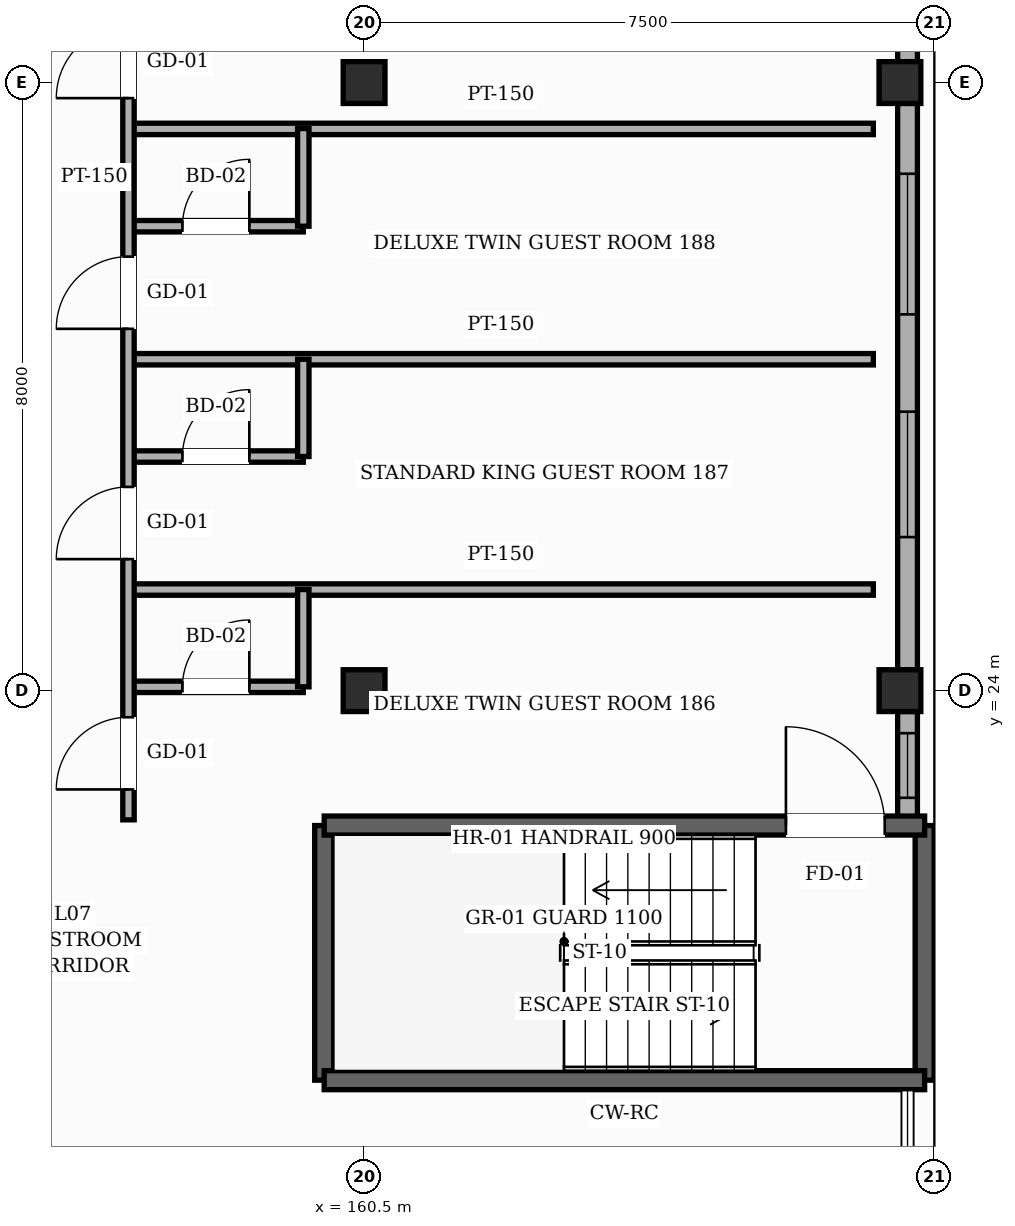
"""IFC4 building model, lengths in metres.
Left out: names, types, materials, properties, quantities, classifications, styles, units other than length and angle.
Written with IfcOpenShell. Run it as: python <this file> out.ifc"""

import sys

from ifc_helpers import new_model, si_unit, direction, frame, frame_2d, origin, origin_2d, place, context, subcontext, project, spatial, rectangle, hollow_rectangle, extrude, element, fill, save


model = new_model("IFC4")
c1 = context("Model", 3, precision=1e-05, world=origin(), true_north=direction((0.0, 1.0)))
c2 = subcontext(c1, "Body", "Model", "MODEL_VIEW")
j1 = project(units=[si_unit("LENGTHUNIT", "METRE"), si_unit("PLANEANGLEUNIT", "RADIAN")], contexts=[c1])
p1 = place(None, origin())
s1 = spatial("IfcSite", under=j1, at=p1, CompositionType="ELEMENT")
p2 = place(p1, origin())
s2 = spatial("IfcBuilding", under=s1, at=p2, CompositionType="ELEMENT")
p3 = place(p2, frame((0.0, 0.0, 31.8)))
s3 = spatial("IfcBuildingStorey", under=s2, at=p3, CompositionType="ELEMENT", Elevation=31.8)
for number, where, z_axis, x_axis in (
    (1, (160.5, 24.0, 0.0), (0.0, 0.0, 1.0), (1.0, 0.0, 0.0)),
    (2, (160.5, 32.0, 0.0), (0.0, 0.0, 1.0), (1.0, 0.0, 0.0)),
    (3, (167.55, 24.0, 0.0), (0.0, 0.0, 1.0), (1.0, 0.0, 0.0)),
    (4, (167.55, 32.0, 0.0), (0.0, 0.0, 1.0), (1.0, 0.0, 0.0)),
):
    element("IfcColumn", number, at=place(p3, frame(where, z_axis=z_axis, x_axis=x_axis)), inside=s3, PredefinedType="COLUMN", context=c2, shape_type="SweptSolid", body=[
        extrude(hollow_rectangle(XDim=0.55, YDim=0.55, WallThickness=0.022, InnerFilletRadius=0.022, OuterFilletRadius=0.044, at=origin_2d()), origin(), (0.0, 0.0, 1.0), 3.6),
    ])
p4 = place(p3, frame((167.65, 23.725, 0.0), z_axis=(0.0, 0.0, 1.0), x_axis=(0.0, -1.0, 0.0)))
e5 = element("IfcWall", 5, at=p4, inside=s3, PredefinedType="SOLIDWALL", context=c2, shape_type="SweptSolid", body=[
    extrude(rectangle(XDim=1.5, YDim=0.26, at=frame_2d((0.75, 0.0))), origin(), (0.0, 0.0, 1.0), 3.365),
])
p5 = place(p4, frame((0.285, 0.0, 0.85)))
e6 = element("IfcOpeningElement", 6, at=p5, cuts=e5, PredefinedType="OPENING", context=c2, shape_type="SweptSolid", body=[
    extrude(rectangle(XDim=0.85, YDim=1.35, at=frame_2d((0.425, 0.675))), frame((0.0, 0.14, 0.0), z_axis=(0.0, -1.0, 0.0), x_axis=(1.0, 0.0, 0.0)), (0.0, 0.0, 1.0), 0.28),
])
p6 = place(p3, frame((167.65, 31.725, 0.0), z_axis=(0.0, 0.0, 1.0), x_axis=(0.0, -1.0, 0.0)))
e7 = element("IfcWall", 7, at=p6, inside=s3, PredefinedType="SOLIDWALL", context=c2, shape_type="SweptSolid", body=[
    extrude(rectangle(XDim=7.45, YDim=0.26, at=frame_2d((3.725, 0.0))), origin(), (0.0, 0.0, 1.0), 2.755),
])
p7 = place(p6, frame((4.055, 0.0, 0.85)))
e8 = element("IfcOpeningElement", 8, at=p7, cuts=e7, PredefinedType="OPENING", context=c2, shape_type="SweptSolid", body=[
    extrude(rectangle(XDim=1.65, YDim=1.5, at=frame_2d((0.825, 0.75))), frame((0.0, 0.14, 0.0), z_axis=(0.0, -1.0, 0.0), x_axis=(1.0, 0.0, 0.0)), (0.0, 0.0, 1.0), 0.28),
])
p8 = place(p6, frame((0.925, 0.0, 0.85)))
e9 = element("IfcOpeningElement", 9, at=p8, cuts=e7, PredefinedType="OPENING", context=c2, shape_type="SweptSolid", body=[
    extrude(rectangle(XDim=1.85, YDim=1.5, at=frame_2d((0.925, 0.75))), frame((0.0, 0.14, 0.0), z_axis=(0.0, -1.0, 0.0), x_axis=(1.0, 0.0, 0.0)), (0.0, 0.0, 1.0), 0.28),
])
p9 = place(p3, frame((167.65, 40.625, 0.0), z_axis=(0.0, 0.0, 1.0), x_axis=(0.0, -1.0, 0.0)))
e10 = element("IfcWall", 10, at=p9, inside=s3, PredefinedType="SOLIDWALL", context=c2, shape_type="SweptSolid", body=[
    extrude(rectangle(XDim=8.35, YDim=0.26, at=frame_2d((4.175, 0.0))), origin(), (0.0, 0.0, 1.0), 2.755),
])
p10 = place(p9, frame((6.85, 0.0, 0.85)))
e11 = element("IfcOpeningElement", 11, at=p10, cuts=e10, PredefinedType="OPENING", context=c2, shape_type="SweptSolid", body=[
    extrude(rectangle(XDim=0.85, YDim=1.35, at=frame_2d((0.425, 0.675))), frame((0.0, 0.14, 0.0), z_axis=(0.0, -1.0, 0.0), x_axis=(1.0, 0.0, 0.0)), (0.0, 0.0, 1.0), 0.28),
])
p11 = place(p9, frame((4.11, 0.0, 0.85)))
e12 = element("IfcOpeningElement", 12, at=p11, cuts=e10, PredefinedType="OPENING", context=c2, shape_type="SweptSolid", body=[
    extrude(rectangle(XDim=1.15, YDim=1.65, at=frame_2d((0.575, 0.825))), frame((0.0, 0.14, 0.0), z_axis=(0.0, -1.0, 0.0), x_axis=(1.0, 0.0, 0.0)), (0.0, 0.0, 1.0), 0.28),
])
p12 = place(p9, frame((0.98, 0.0, 0.85)))
e13 = element("IfcOpeningElement", 13, at=p12, cuts=e10, PredefinedType="OPENING", context=c2, shape_type="SweptSolid", body=[
    extrude(rectangle(XDim=1.35, YDim=1.65, at=frame_2d((0.675, 0.825))), frame((0.0, 0.14, 0.0), z_axis=(0.0, -1.0, 0.0), x_axis=(1.0, 0.0, 0.0)), (0.0, 0.0, 1.0), 0.28),
])
for number, where, z_axis, x_axis in (
    (14, (167.875, 22.225, 0.0), (0.0, 0.0, 1.0), (0.0, -1.0, 0.0)),
    (15, (159.975, 18.875, 0.0), (0.0, 0.0, 1.0), (0.0, 1.0, 0.0)),
):
    element("IfcWall", number, at=place(p3, frame(where, z_axis=z_axis, x_axis=x_axis)), inside=s3, PredefinedType="SHEAR", context=c2, shape_type="SweptSolid", body=[
        extrude(rectangle(XDim=3.35, YDim=0.25, at=frame_2d((1.675, 0.0))), origin(), (0.0, 0.0, 1.0), 3.38),
    ])
p13 = place(p3, frame((159.975, 22.225, 0.0), z_axis=(0.0, 0.0, 1.0), x_axis=(1.0, 0.0, 0.0)))
e16 = element("IfcWall", 16, at=p13, inside=s3, PredefinedType="SHEAR", context=c2, shape_type="SweptSolid", body=[
    extrude(rectangle(XDim=7.9, YDim=0.25, at=frame_2d((3.95, 0.0))), origin(), (0.0, 0.0, 1.0), 3.38),
])
p14 = place(p13, frame((6.075, 0.0, 0.0)))
e17 = element("IfcOpeningElement", 17, at=p14, cuts=e16, PredefinedType="OPENING", context=c2, shape_type="SweptSolid", body=[
    extrude(rectangle(XDim=1.3, YDim=2.2, at=frame_2d((0.65, 1.1))), frame((0.0, 0.135, 0.0), z_axis=(0.0, -1.0, 0.0), x_axis=(1.0, 0.0, 0.0)), (0.0, 0.0, 1.0), 0.27),
])
p15 = place(p3, frame((167.875, 18.875, 0.0), z_axis=(0.0, 0.0, 1.0), x_axis=(-1.0, 0.0, 0.0)))
e18 = element("IfcWall", 18, at=p15, inside=s3, PredefinedType="SHEAR", context=c2, shape_type="SweptSolid", body=[
    extrude(rectangle(XDim=7.9, YDim=0.25, at=frame_2d((3.95, 0.0))), origin(), (0.0, 0.0, 1.0), 3.38),
])
p16 = place(p3, frame((157.4, 24.05, 0.0), z_axis=(0.0, 0.0, 1.0), x_axis=(1.0, 0.0, 0.0)))
e19 = element("IfcWall", 19, at=p16, inside=s3, PredefinedType="PARTITIONING", context=c2, shape_type="SweptSolid", body=[
    extrude(rectangle(XDim=2.3, YDim=0.15, at=frame_2d((1.15, 0.0))), origin(), (0.0, 0.0, 1.0), 2.755),
])
p17 = place(p16, frame((0.71, 0.0, 0.0)))
e20 = element("IfcOpeningElement", 20, at=p17, cuts=e19, PredefinedType="OPENING", context=c2, shape_type="SweptSolid", body=[
    extrude(rectangle(XDim=0.88, YDim=2.12, at=frame_2d((0.44, 1.06))), frame((0.0, 0.085, 0.0), z_axis=(0.0, -1.0, 0.0), x_axis=(1.0, 0.0, 0.0)), (0.0, 0.0, 1.0), 0.17),
])
p18 = place(p3, frame((157.4, 25.33, 0.0), z_axis=(0.0, 0.0, 1.0), x_axis=(1.0, 0.0, 0.0)))
e21 = element("IfcWall", 21, at=p18, inside=s3, PredefinedType="PARTITIONING", context=c2, shape_type="SweptSolid", body=[
    extrude(rectangle(XDim=9.8, YDim=0.15, at=frame_2d((4.9, 0.0))), origin(), (0.0, 0.0, 1.0), 3.365),
])
p19 = place(p3, frame((157.4, 27.08, 0.0), z_axis=(0.0, 0.0, 1.0), x_axis=(1.0, 0.0, 0.0)))
e22 = element("IfcWall", 22, at=p19, inside=s3, PredefinedType="PARTITIONING", context=c2, shape_type="SweptSolid", body=[
    extrude(rectangle(XDim=2.3, YDim=0.15, at=frame_2d((1.15, 0.0))), origin(), (0.0, 0.0, 1.0), 3.365),
])
p20 = place(p19, frame((0.71, 0.0, 0.0)))
e23 = element("IfcOpeningElement", 23, at=p20, cuts=e22, PredefinedType="OPENING", context=c2, shape_type="SweptSolid", body=[
    extrude(rectangle(XDim=0.88, YDim=2.12, at=frame_2d((0.44, 1.06))), frame((0.0, 0.085, 0.0), z_axis=(0.0, -1.0, 0.0), x_axis=(1.0, 0.0, 0.0)), (0.0, 0.0, 1.0), 0.17),
])
p21 = place(p3, frame((157.4, 28.36, 0.0), z_axis=(0.0, 0.0, 1.0), x_axis=(1.0, 0.0, 0.0)))
e24 = element("IfcWall", 24, at=p21, inside=s3, PredefinedType="PARTITIONING", context=c2, shape_type="SweptSolid", body=[
    extrude(rectangle(XDim=9.8, YDim=0.15, at=frame_2d((4.9, 0.0))), origin(), (0.0, 0.0, 1.0), 3.365),
])
p22 = place(p3, frame((157.4, 30.11, 0.0), z_axis=(0.0, 0.0, 1.0), x_axis=(1.0, 0.0, 0.0)))
e25 = element("IfcWall", 25, at=p22, inside=s3, PredefinedType="PARTITIONING", context=c2, shape_type="SweptSolid", body=[
    extrude(rectangle(XDim=2.3, YDim=0.15, at=frame_2d((1.15, 0.0))), origin(), (0.0, 0.0, 1.0), 3.365),
])
p23 = place(p22, frame((0.71, 0.0, 0.0)))
e26 = element("IfcOpeningElement", 26, at=p23, cuts=e25, PredefinedType="OPENING", context=c2, shape_type="SweptSolid", body=[
    extrude(rectangle(XDim=0.88, YDim=2.12, at=frame_2d((0.44, 1.06))), frame((0.0, 0.085, 0.0), z_axis=(0.0, -1.0, 0.0), x_axis=(1.0, 0.0, 0.0)), (0.0, 0.0, 1.0), 0.17),
])
p24 = place(p3, frame((157.4, 31.39, 0.0), z_axis=(0.0, 0.0, 1.0), x_axis=(1.0, 0.0, 0.0)))
e27 = element("IfcWall", 27, at=p24, inside=s3, PredefinedType="PARTITIONING", context=c2, shape_type="SweptSolid", body=[
    extrude(rectangle(XDim=9.8, YDim=0.15, at=frame_2d((4.9, 0.0))), origin(), (0.0, 0.0, 1.0), 3.365),
])
p25 = place(p3, frame((157.4, 22.3, 0.0), z_axis=(0.0, 0.0, 1.0), x_axis=(0.0, 1.0, 0.0)))
e28 = element("IfcWall", 28, at=p25, inside=s3, PredefinedType="PARTITIONING", context=c2, shape_type="SweptSolid", body=[
    extrude(rectangle(XDim=48.5, YDim=0.15, at=frame_2d((24.25, 0.0))), origin(), (0.0, 0.0, 1.0), 3.365),
])
p26 = place(p25, frame((0.4, 0.0, 0.0)))
e29 = element("IfcOpeningElement", 29, at=p26, cuts=e28, PredefinedType="OPENING", context=c2, shape_type="SweptSolid", body=[
    extrude(rectangle(XDim=0.95, YDim=2.15, at=frame_2d((0.475, 1.075))), frame((0.0, 0.085, 0.0), z_axis=(0.0, -1.0, 0.0), x_axis=(1.0, 0.0, 0.0)), (0.0, 0.0, 1.0), 0.17),
])
p27 = place(p25, frame((3.43, 0.0, 0.0)))
e30 = element("IfcOpeningElement", 30, at=p27, cuts=e28, PredefinedType="OPENING", context=c2, shape_type="SweptSolid", body=[
    extrude(rectangle(XDim=0.95, YDim=2.15, at=frame_2d((0.475, 1.075))), frame((0.0, 0.085, 0.0), z_axis=(0.0, -1.0, 0.0), x_axis=(1.0, 0.0, 0.0)), (0.0, 0.0, 1.0), 0.17),
])
p28 = place(p25, frame((6.46, 0.0, 0.0)))
e31 = element("IfcOpeningElement", 31, at=p28, cuts=e28, PredefinedType="OPENING", context=c2, shape_type="SweptSolid", body=[
    extrude(rectangle(XDim=0.95, YDim=2.15, at=frame_2d((0.475, 1.075))), frame((0.0, 0.085, 0.0), z_axis=(0.0, -1.0, 0.0), x_axis=(1.0, 0.0, 0.0)), (0.0, 0.0, 1.0), 0.17),
])
p29 = place(p25, frame((9.495, 0.0, 0.0)))
e32 = element("IfcOpeningElement", 32, at=p29, cuts=e28, PredefinedType="OPENING", context=c2, shape_type="SweptSolid", body=[
    extrude(rectangle(XDim=0.95, YDim=2.15, at=frame_2d((0.475, 1.075))), frame((0.0, 0.085, 0.0), z_axis=(0.0, -1.0, 0.0), x_axis=(1.0, 0.0, 0.0)), (0.0, 0.0, 1.0), 0.17),
])
p30 = place(p25, frame((12.525, 0.0, 0.0)))
e33 = element("IfcOpeningElement", 33, at=p30, cuts=e28, PredefinedType="OPENING", context=c2, shape_type="SweptSolid", body=[
    extrude(rectangle(XDim=0.95, YDim=2.15, at=frame_2d((0.475, 1.075))), frame((0.0, 0.085, 0.0), z_axis=(0.0, -1.0, 0.0), x_axis=(1.0, 0.0, 0.0)), (0.0, 0.0, 1.0), 0.17),
])
p31 = place(p25, frame((15.555, 0.0, 0.0)))
e34 = element("IfcOpeningElement", 34, at=p31, cuts=e28, PredefinedType="OPENING", context=c2, shape_type="SweptSolid", body=[
    extrude(rectangle(XDim=0.95, YDim=2.15, at=frame_2d((0.475, 1.075))), frame((0.0, 0.085, 0.0), z_axis=(0.0, -1.0, 0.0), x_axis=(1.0, 0.0, 0.0)), (0.0, 0.0, 1.0), 0.17),
])
p32 = place(p25, frame((18.585, 0.0, 0.0)))
e35 = element("IfcOpeningElement", 35, at=p32, cuts=e28, PredefinedType="OPENING", context=c2, shape_type="SweptSolid", body=[
    extrude(rectangle(XDim=0.95, YDim=2.15, at=frame_2d((0.475, 1.075))), frame((0.0, 0.085, 0.0), z_axis=(0.0, -1.0, 0.0), x_axis=(1.0, 0.0, 0.0)), (0.0, 0.0, 1.0), 0.17),
])
p33 = place(p25, frame((21.62, 0.0, 0.0)))
e36 = element("IfcOpeningElement", 36, at=p33, cuts=e28, PredefinedType="OPENING", context=c2, shape_type="SweptSolid", body=[
    extrude(rectangle(XDim=0.95, YDim=2.15, at=frame_2d((0.475, 1.075))), frame((0.0, 0.085, 0.0), z_axis=(0.0, -1.0, 0.0), x_axis=(1.0, 0.0, 0.0)), (0.0, 0.0, 1.0), 0.17),
])
p34 = place(p25, frame((24.65, 0.0, 0.0)))
e37 = element("IfcOpeningElement", 37, at=p34, cuts=e28, PredefinedType="OPENING", context=c2, shape_type="SweptSolid", body=[
    extrude(rectangle(XDim=0.95, YDim=2.15, at=frame_2d((0.475, 1.075))), frame((0.0, 0.085, 0.0), z_axis=(0.0, -1.0, 0.0), x_axis=(1.0, 0.0, 0.0)), (0.0, 0.0, 1.0), 0.17),
])
p35 = place(p25, frame((27.68, 0.0, 0.0)))
e38 = element("IfcOpeningElement", 38, at=p35, cuts=e28, PredefinedType="OPENING", context=c2, shape_type="SweptSolid", body=[
    extrude(rectangle(XDim=0.95, YDim=2.15, at=frame_2d((0.475, 1.075))), frame((0.0, 0.085, 0.0), z_axis=(0.0, -1.0, 0.0), x_axis=(1.0, 0.0, 0.0)), (0.0, 0.0, 1.0), 0.17),
])
p36 = place(p25, frame((30.71, 0.0, 0.0)))
e39 = element("IfcOpeningElement", 39, at=p36, cuts=e28, PredefinedType="OPENING", context=c2, shape_type="SweptSolid", body=[
    extrude(rectangle(XDim=0.95, YDim=2.15, at=frame_2d((0.475, 1.075))), frame((0.0, 0.085, 0.0), z_axis=(0.0, -1.0, 0.0), x_axis=(1.0, 0.0, 0.0)), (0.0, 0.0, 1.0), 0.17),
])
p37 = place(p25, frame((33.745, 0.0, 0.0)))
e40 = element("IfcOpeningElement", 40, at=p37, cuts=e28, PredefinedType="OPENING", context=c2, shape_type="SweptSolid", body=[
    extrude(rectangle(XDim=0.95, YDim=2.15, at=frame_2d((0.475, 1.075))), frame((0.0, 0.085, 0.0), z_axis=(0.0, -1.0, 0.0), x_axis=(1.0, 0.0, 0.0)), (0.0, 0.0, 1.0), 0.17),
])
p38 = place(p25, frame((36.775, 0.0, 0.0)))
e41 = element("IfcOpeningElement", 41, at=p38, cuts=e28, PredefinedType="OPENING", context=c2, shape_type="SweptSolid", body=[
    extrude(rectangle(XDim=0.95, YDim=2.15, at=frame_2d((0.475, 1.075))), frame((0.0, 0.085, 0.0), z_axis=(0.0, -1.0, 0.0), x_axis=(1.0, 0.0, 0.0)), (0.0, 0.0, 1.0), 0.17),
])
p39 = place(p25, frame((39.805, 0.0, 0.0)))
e42 = element("IfcOpeningElement", 42, at=p39, cuts=e28, PredefinedType="OPENING", context=c2, shape_type="SweptSolid", body=[
    extrude(rectangle(XDim=0.95, YDim=2.15, at=frame_2d((0.475, 1.075))), frame((0.0, 0.085, 0.0), z_axis=(0.0, -1.0, 0.0), x_axis=(1.0, 0.0, 0.0)), (0.0, 0.0, 1.0), 0.17),
])
p40 = place(p25, frame((42.84, 0.0, 0.0)))
e43 = element("IfcOpeningElement", 43, at=p40, cuts=e28, PredefinedType="OPENING", context=c2, shape_type="SweptSolid", body=[
    extrude(rectangle(XDim=0.95, YDim=2.15, at=frame_2d((0.475, 1.075))), frame((0.0, 0.085, 0.0), z_axis=(0.0, -1.0, 0.0), x_axis=(1.0, 0.0, 0.0)), (0.0, 0.0, 1.0), 0.17),
])
p41 = place(p25, frame((45.87, 0.0, 0.0)))
e44 = element("IfcOpeningElement", 44, at=p41, cuts=e28, PredefinedType="OPENING", context=c2, shape_type="SweptSolid", body=[
    extrude(rectangle(XDim=0.95, YDim=2.15, at=frame_2d((0.475, 1.075))), frame((0.0, 0.085, 0.0), z_axis=(0.0, -1.0, 0.0), x_axis=(1.0, 0.0, 0.0)), (0.0, 0.0, 1.0), 0.17),
])
for number, where, z_axis, x_axis in (
    (45, (159.7, 24.05, 0.0), (0.0, 0.0, 1.0), (0.0, 1.0, 0.0)),
    (46, (159.7, 27.08, 0.0), (0.0, 0.0, 1.0), (0.0, 1.0, 0.0)),
):
    element("IfcWall", number, at=place(p3, frame(where, z_axis=z_axis, x_axis=x_axis)), inside=s3, PredefinedType="PARTITIONING", context=c2, shape_type="SweptSolid", body=[
        extrude(rectangle(XDim=1.28, YDim=0.15, at=frame_2d((0.64, 0.0))), origin(), (0.0, 0.0, 1.0), 3.365),
    ])
p42 = place(p3, frame((159.7, 30.11, 0.0), z_axis=(0.0, 0.0, 1.0), x_axis=(0.0, 1.0, 0.0)))
e47 = element("IfcWall", 47, at=p42, inside=s3, PredefinedType="PARTITIONING", context=c2, shape_type="SweptSolid", body=[
    extrude(rectangle(XDim=1.285, YDim=0.15, at=frame_2d((0.643, 0.0))), origin(), (0.0, 0.0, 1.0), 3.365),
])
p43 = place(p5, origin())
e48 = element("IfcWindow", 48, at=p43, inside=s3, PartitioningType="SINGLE_PANEL", PredefinedType="WINDOW", context=c2, shape_type="SweptSolid", body=[
    extrude(rectangle(XDim=0.85, YDim=1.35, at=frame_2d((0.425, 0.675))), frame((0.0, 0.03, 0.0), z_axis=(0.0, -1.0, 0.0), x_axis=(1.0, 0.0, 0.0)), (0.0, 0.0, 1.0), 0.06),
])
fill(e6, e48)
p44 = place(p7, origin())
e49 = element("IfcWindow", 49, at=p44, inside=s3, PartitioningType="SINGLE_PANEL", PredefinedType="WINDOW", context=c2, shape_type="SweptSolid", body=[
    extrude(rectangle(XDim=1.65, YDim=1.5, at=frame_2d((0.825, 0.75))), frame((0.0, 0.03, 0.0), z_axis=(0.0, -1.0, 0.0), x_axis=(1.0, 0.0, 0.0)), (0.0, 0.0, 1.0), 0.06),
])
fill(e8, e49)
p45 = place(p8, origin())
e50 = element("IfcWindow", 50, at=p45, inside=s3, PartitioningType="SINGLE_PANEL", PredefinedType="WINDOW", context=c2, shape_type="SweptSolid", body=[
    extrude(rectangle(XDim=1.85, YDim=1.5, at=frame_2d((0.925, 0.75))), frame((0.0, 0.03, 0.0), z_axis=(0.0, -1.0, 0.0), x_axis=(1.0, 0.0, 0.0)), (0.0, 0.0, 1.0), 0.06),
])
fill(e9, e50)
p46 = place(p14, origin())
e51 = element("IfcDoor", 51, at=p46, inside=s3, OperationType="SINGLE_SWING_LEFT", PredefinedType="DOOR", context=c2, shape_type="SweptSolid", body=[
    extrude(rectangle(XDim=1.3, YDim=2.2, at=frame_2d((0.65, 1.1))), frame((0.0, 0.025, 0.0), z_axis=(0.0, -1.0, 0.0), x_axis=(1.0, 0.0, 0.0)), (0.0, 0.0, 1.0), 0.05),
])
fill(e17, e51)
p47 = place(p26, origin())
e52 = element("IfcDoor", 52, at=p47, inside=s3, OperationType="SINGLE_SWING_LEFT", PredefinedType="DOOR", context=c2, shape_type="SweptSolid", body=[
    extrude(rectangle(XDim=0.95, YDim=2.15, at=frame_2d((0.475, 1.075))), frame((0.0, 0.025, 0.0), z_axis=(0.0, -1.0, 0.0), x_axis=(1.0, 0.0, 0.0)), (0.0, 0.0, 1.0), 0.05),
])
fill(e29, e52)
p48 = place(p17, origin())
e53 = element("IfcDoor", 53, at=p48, inside=s3, OperationType="SINGLE_SWING_RIGHT", PredefinedType="DOOR", context=c2, shape_type="SweptSolid", body=[
    extrude(rectangle(XDim=0.88, YDim=2.12, at=frame_2d((0.44, 1.06))), frame((0.0, 0.025, 0.0), z_axis=(0.0, -1.0, 0.0), x_axis=(1.0, 0.0, 0.0)), (0.0, 0.0, 1.0), 0.05),
])
fill(e20, e53)
p49 = place(p27, origin())
e54 = element("IfcDoor", 54, at=p49, inside=s3, OperationType="SINGLE_SWING_LEFT", PredefinedType="DOOR", context=c2, shape_type="SweptSolid", body=[
    extrude(rectangle(XDim=0.95, YDim=2.15, at=frame_2d((0.475, 1.075))), frame((0.0, 0.025, 0.0), z_axis=(0.0, -1.0, 0.0), x_axis=(1.0, 0.0, 0.0)), (0.0, 0.0, 1.0), 0.05),
])
fill(e30, e54)
p50 = place(p20, origin())
e55 = element("IfcDoor", 55, at=p50, inside=s3, OperationType="SINGLE_SWING_RIGHT", PredefinedType="DOOR", context=c2, shape_type="SweptSolid", body=[
    extrude(rectangle(XDim=0.88, YDim=2.12, at=frame_2d((0.44, 1.06))), frame((0.0, 0.025, 0.0), z_axis=(0.0, -1.0, 0.0), x_axis=(1.0, 0.0, 0.0)), (0.0, 0.0, 1.0), 0.05),
])
fill(e23, e55)
p51 = place(p28, origin())
e56 = element("IfcDoor", 56, at=p51, inside=s3, OperationType="SINGLE_SWING_LEFT", PredefinedType="DOOR", context=c2, shape_type="SweptSolid", body=[
    extrude(rectangle(XDim=0.95, YDim=2.15, at=frame_2d((0.475, 1.075))), frame((0.0, 0.025, 0.0), z_axis=(0.0, -1.0, 0.0), x_axis=(1.0, 0.0, 0.0)), (0.0, 0.0, 1.0), 0.05),
])
fill(e31, e56)
p52 = place(p23, origin())
e57 = element("IfcDoor", 57, at=p52, inside=s3, OperationType="SINGLE_SWING_RIGHT", PredefinedType="DOOR", context=c2, shape_type="SweptSolid", body=[
    extrude(rectangle(XDim=0.88, YDim=2.12, at=frame_2d((0.44, 1.06))), frame((0.0, 0.025, 0.0), z_axis=(0.0, -1.0, 0.0), x_axis=(1.0, 0.0, 0.0)), (0.0, 0.0, 1.0), 0.05),
])
fill(e26, e57)
p53 = place(p29, origin())
e58 = element("IfcDoor", 58, at=p53, inside=s3, OperationType="SINGLE_SWING_LEFT", PredefinedType="DOOR", context=c2, shape_type="SweptSolid", body=[
    extrude(rectangle(XDim=0.95, YDim=2.15, at=frame_2d((0.475, 1.075))), frame((0.0, 0.025, 0.0), z_axis=(0.0, -1.0, 0.0), x_axis=(1.0, 0.0, 0.0)), (0.0, 0.0, 1.0), 0.05),
])
fill(e32, e58)
save(model, sys.argv[1])
